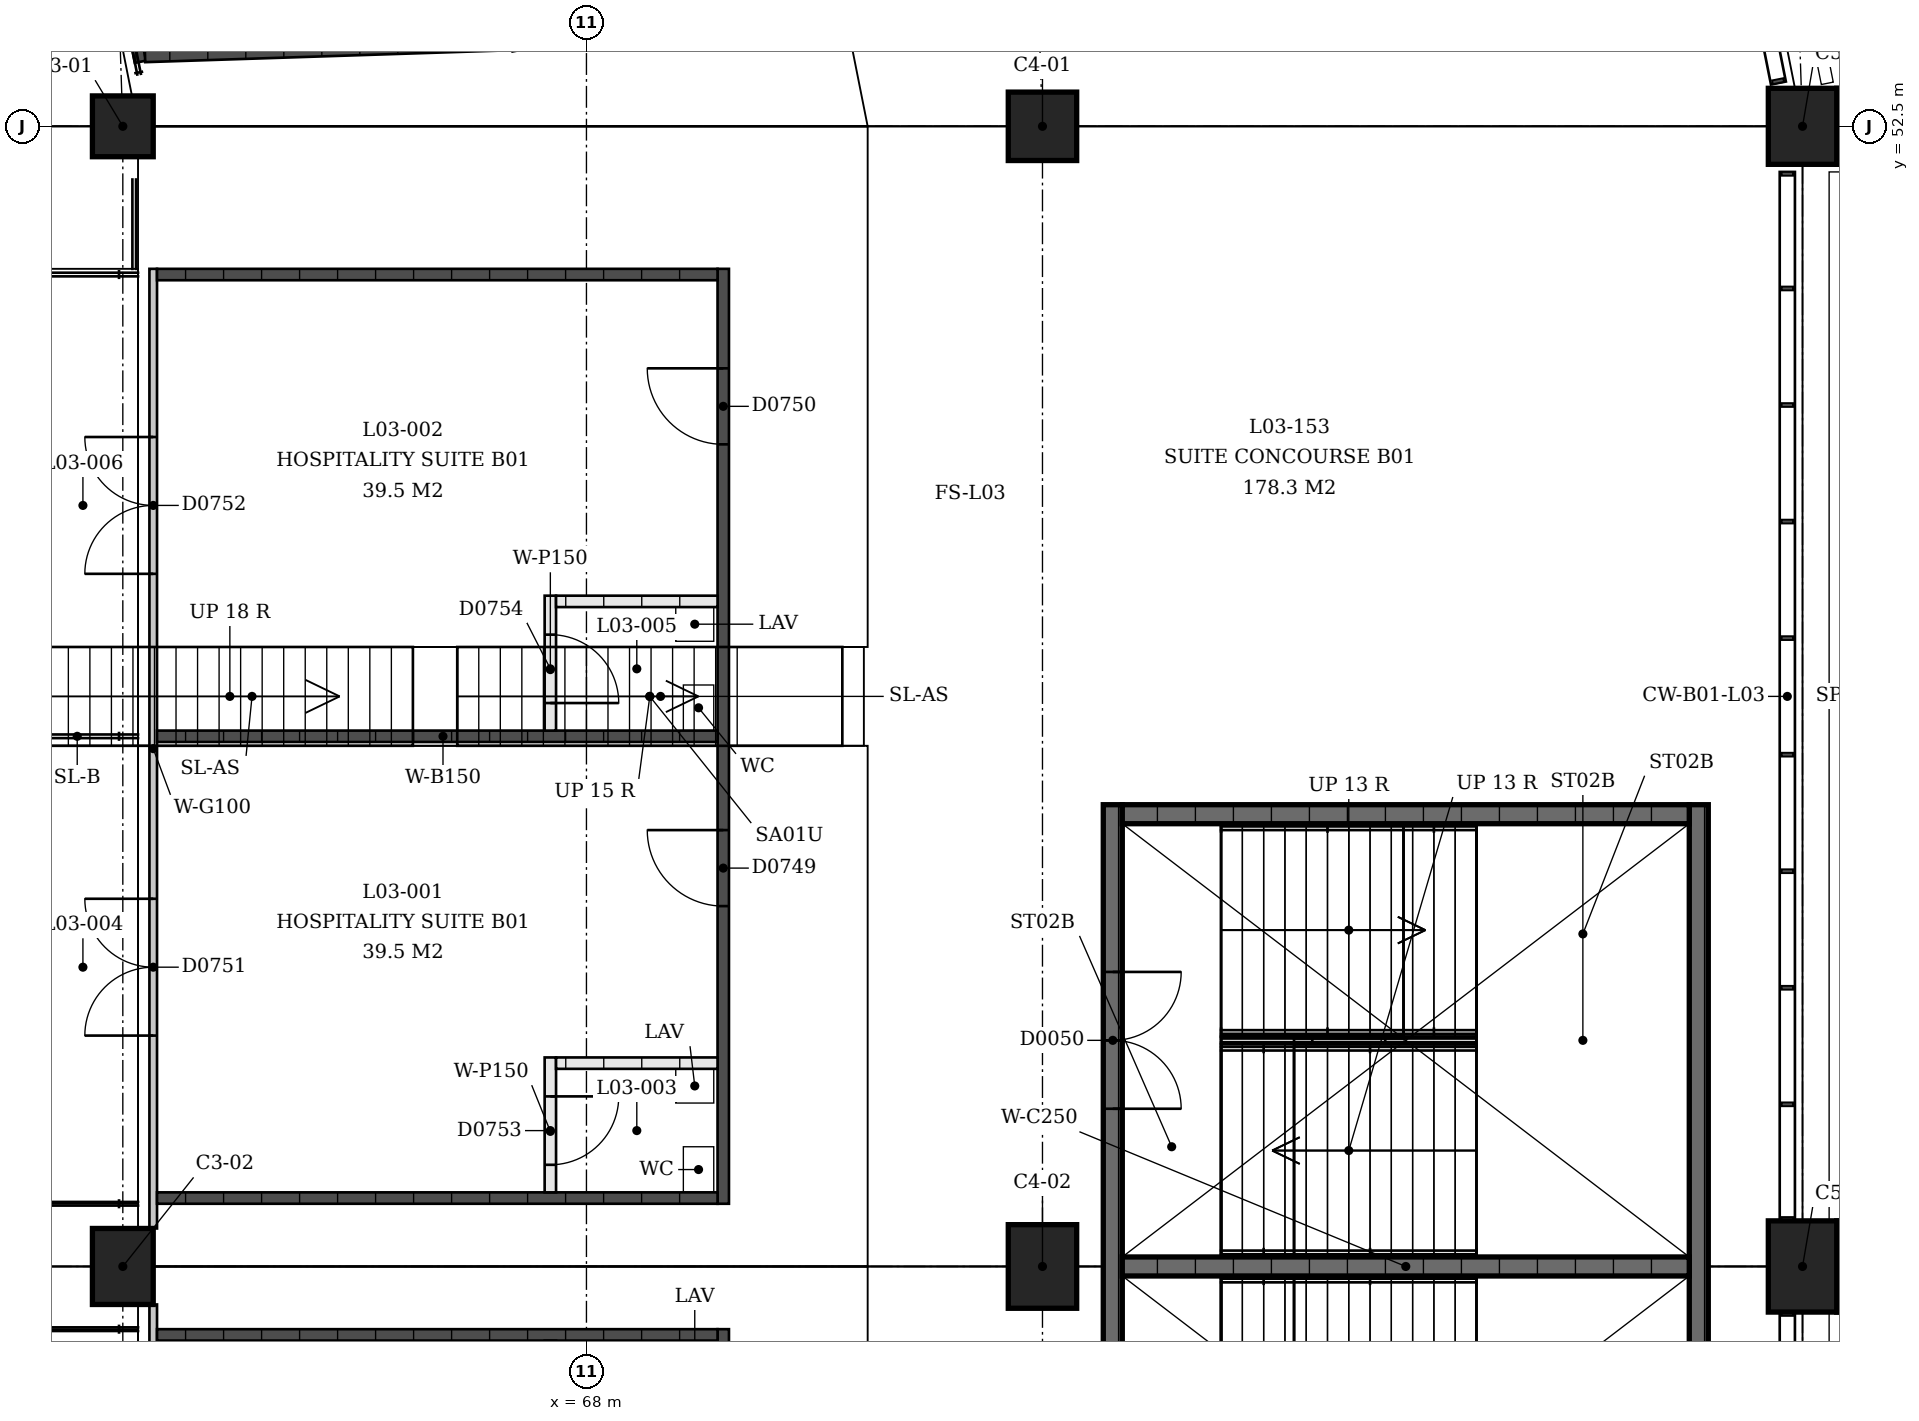
"""IFC4 building model, lengths in metres.
Left out: names, types, materials, properties, quantities, classifications, styles, units other than length and angle.
Written with IfcOpenShell. Run it as: python <this file> out.ifc"""

import sys

from ifc_helpers import new_model, si_unit, direction, frame, frame_2d, origin, origin_2d, place, context, subcontext, project, spatial, rectangle, extrude, element, fill, save


model = new_model("IFC4")
c1 = context("Model", 3, precision=1e-05, world=origin(), true_north=direction((0.0, 1.0)))
c2 = subcontext(c1, "Body", "Model", "MODEL_VIEW")
j1 = project(units=[si_unit("LENGTHUNIT", "METRE"), si_unit("PLANEANGLEUNIT", "RADIAN")], contexts=[c1])
p1 = place(None, origin())
s1 = spatial("IfcSite", under=j1, at=p1, CompositionType="ELEMENT")
p2 = place(p1, origin())
s2 = spatial("IfcBuilding", under=s1, at=p2, CompositionType="ELEMENT")
p3 = place(p2, frame((0.0, 0.0, 13.5)))
s3 = spatial("IfcBuildingStorey", under=s2, at=p3, CompositionType="ELEMENT", Elevation=13.5)
p4 = place(p3, frame((61.9, 52.5, 0.0), z_axis=(0.0, 0.0, 1.0), x_axis=(0.0, 1.0, 0.0)))
e1 = element("IfcColumn", 1, at=p4, inside=s3, PredefinedType="COLUMN", context=c2, shape_type="SweptSolid", body=[
    extrude(rectangle(XDim=0.8, YDim=0.8, at=origin_2d()), origin(), (0.0, 0.0, 1.0), 2.033),
])
p5 = place(p3, frame((74.0, 52.5, 0.0), z_axis=(0.0, 0.0, 1.0), x_axis=(0.0, 1.0, 0.0)))
e2 = element("IfcColumn", 2, at=p5, inside=s3, PredefinedType="COLUMN", context=c2, shape_type="SweptSolid", body=[
    extrude(rectangle(XDim=0.9, YDim=0.9, at=origin_2d()), origin(), (0.0, 0.0, 1.0), 4.5),
])
p6 = place(p3, frame((84.0, 52.5, 0.0), z_axis=(0.0, 0.0, 1.0), x_axis=(0.0, 1.0, 0.0)))
e3 = element("IfcColumn", 3, at=p6, inside=s3, PredefinedType="COLUMN", context=c2, shape_type="SweptSolid", body=[
    extrude(rectangle(XDim=1.0, YDim=0.9, at=origin_2d()), origin(), (0.0, 0.0, 1.0), 4.5),
])
p7 = place(p3, frame((61.9, 37.5, 0.0), z_axis=(0.0, 0.0, 1.0), x_axis=(0.0, 1.0, 0.0)))
e4 = element("IfcColumn", 4, at=p7, inside=s3, PredefinedType="COLUMN", context=c2, shape_type="SweptSolid", body=[
    extrude(rectangle(XDim=1.0, YDim=0.8, at=origin_2d()), origin(), (0.0, 0.0, 1.0), 2.033),
])
p8 = place(p3, frame((74.0, 37.5, 0.0), z_axis=(0.0, 0.0, 1.0), x_axis=(0.0, 1.0, 0.0)))
e5 = element("IfcColumn", 5, at=p8, inside=s3, PredefinedType="COLUMN", context=c2, shape_type="SweptSolid", body=[
    extrude(rectangle(XDim=1.1, YDim=0.9, at=origin_2d()), origin(), (0.0, 0.0, 1.0), 4.5),
])
p9 = place(p3, frame((84.0, 37.5, 0.0), z_axis=(0.0, 0.0, 1.0), x_axis=(0.0, 1.0, 0.0)))
e6 = element("IfcColumn", 6, at=p9, inside=s3, PredefinedType="COLUMN", context=c2, shape_type="SweptSolid", body=[
    extrude(rectangle(XDim=1.2, YDim=0.9, at=origin_2d()), origin(), (0.0, 0.0, 1.0), 4.5),
])
p10 = place(p3, frame((74.925, 31.425, 0.0), z_axis=(0.0, 0.0, 1.0), x_axis=(0.0, 1.0, 0.0)))
e7 = element("IfcWall", 7, at=p10, inside=s3, PredefinedType="SHEAR", context=c2, shape_type="SweptSolid", body=[
    extrude(rectangle(XDim=12.15, YDim=0.25, at=frame_2d((6.075, 0.0))), origin(), (0.0, 0.0, 1.0), 4.09),
])
p11 = place(p10, frame((2.2, 0.0, 0.0)))
e8 = element("IfcOpeningElement", 8, at=p11, cuts=e7, PredefinedType="OPENING", context=c2, shape_type="SweptSolid", body=[
    extrude(rectangle(XDim=1.8, YDim=2.1, at=frame_2d((0.9, 1.05))), frame((0.0, 0.125, 0.0), z_axis=(0.0, -1.0, 0.0), x_axis=(1.0, 0.0, 0.0)), (0.0, 0.0, 1.0), 0.25),
])
p12 = place(p10, frame((8.15, 0.0, 0.0)))
e9 = element("IfcOpeningElement", 9, at=p12, cuts=e7, PredefinedType="OPENING", context=c2, shape_type="SweptSolid", body=[
    extrude(rectangle(XDim=1.8, YDim=2.1, at=frame_2d((0.9, 1.05))), frame((0.0, 0.125, 0.0), z_axis=(0.0, -1.0, 0.0), x_axis=(1.0, 0.0, 0.0)), (0.0, 0.0, 1.0), 0.25),
])
p13 = place(p3, frame((82.635, 31.425, 0.0), z_axis=(0.0, 0.0, 1.0), x_axis=(0.0, 1.0, 0.0)))
e10 = element("IfcWall", 10, at=p13, inside=s3, PredefinedType="SHEAR", context=c2, shape_type="SweptSolid", body=[
    extrude(rectangle(XDim=12.15, YDim=0.25, at=frame_2d((6.075, 0.0))), origin(), (0.0, 0.0, 1.0), 4.09),
])
for number, where, z_axis, x_axis in (
    (11, (75.05, 43.45, 0.0), (0.0, 0.0, 1.0), (1.0, 0.0, 0.0)),
    (12, (75.05, 37.5, 0.0), (0.0, 0.0, 1.0), (1.0, 0.0, 0.0)),
):
    element("IfcWall", number, at=place(p3, frame(where, z_axis=z_axis, x_axis=x_axis)), inside=s3, PredefinedType="SHEAR", context=c2, shape_type="SweptSolid", body=[
        extrude(rectangle(XDim=7.46, YDim=0.25, at=frame_2d((3.73, 0.0))), origin(), (0.0, 0.0, 1.0), 4.09),
    ])
p14 = place(p3, frame((62.3, 38.0, 0.0), z_axis=(0.0, 0.0, 1.0), x_axis=(0.0, 1.0, 0.0)))
e13 = element("IfcWall", 13, at=p14, inside=s3, PredefinedType="PARTITIONING", context=c2, shape_type="SweptSolid", body=[
    extrude(rectangle(XDim=12.625, YDim=0.1, at=frame_2d((6.312, 0.0))), origin(), (0.0, 0.0, 1.0), 3.0),
])
p15 = place(p14, frame((2.538, 0.0, 0.0)))
e14 = element("IfcOpeningElement", 14, at=p15, cuts=e13, PredefinedType="OPENING", context=c2, shape_type="SweptSolid", body=[
    extrude(rectangle(XDim=1.8, YDim=2.1, at=frame_2d((0.9, 1.05))), frame((0.0, 0.05, 0.0), z_axis=(0.0, -1.0, 0.0), x_axis=(1.0, 0.0, 0.0)), (0.0, 0.0, 1.0), 0.1),
])
p16 = place(p14, frame((8.613, 0.0, 0.0)))
e15 = element("IfcOpeningElement", 15, at=p16, cuts=e13, PredefinedType="OPENING", context=c2, shape_type="SweptSolid", body=[
    extrude(rectangle(XDim=1.8, YDim=2.1, at=frame_2d((0.9, 1.05))), frame((0.0, 0.05, 0.0), z_axis=(0.0, -1.0, 0.0), x_axis=(1.0, 0.0, 0.0)), (0.0, 0.0, 1.0), 0.1),
])
p17 = place(p3, frame((69.8, 38.325, 0.0), z_axis=(0.0, 0.0, 1.0), x_axis=(0.0, 1.0, 0.0)))
e16 = element("IfcWall", 16, at=p17, inside=s3, PredefinedType="SOLIDWALL", context=c2, shape_type="SweptSolid", body=[
    extrude(rectangle(XDim=12.3, YDim=0.15, at=frame_2d((6.15, 0.0))), origin(), (0.0, 0.0, 1.0), 3.0),
])
p18 = place(p17, frame((3.916, 0.0, 0.0)))
e17 = element("IfcOpeningElement", 17, at=p18, cuts=e16, PredefinedType="OPENING", context=c2, shape_type="SweptSolid", body=[
    extrude(rectangle(XDim=1.0, YDim=2.1, at=frame_2d((0.5, 1.05))), frame((0.0, 0.075, 0.0), z_axis=(0.0, -1.0, 0.0), x_axis=(1.0, 0.0, 0.0)), (0.0, 0.0, 1.0), 0.15),
])
p19 = place(p17, frame((9.991, 0.0, 0.0)))
e18 = element("IfcOpeningElement", 18, at=p19, cuts=e16, PredefinedType="OPENING", context=c2, shape_type="SweptSolid", body=[
    extrude(rectangle(XDim=1.0, YDim=2.1, at=frame_2d((0.5, 1.05))), frame((0.0, 0.075, 0.0), z_axis=(0.0, -1.0, 0.0), x_axis=(1.0, 0.0, 0.0)), (0.0, 0.0, 1.0), 0.15),
])
for number, where, z_axis, x_axis in (
    (19, (62.35, 38.4, 0.0), (0.0, 0.0, 1.0), (1.0, 0.0, 0.0)),
    (20, (62.35, 44.475, 0.0), (0.0, 0.0, 1.0), (1.0, 0.0, 0.0)),
    (21, (62.35, 50.55, 0.0), (0.0, 0.0, 1.0), (1.0, 0.0, 0.0)),
):
    element("IfcWall", number, at=place(p3, frame(where, z_axis=z_axis, x_axis=x_axis)), inside=s3, PredefinedType="SOLIDWALL", context=c2, shape_type="SweptSolid", body=[
        extrude(rectangle(XDim=7.375, YDim=0.15, at=frame_2d((3.688, 0.0))), origin(), (0.0, 0.0, 1.0), 3.0),
    ])
p20 = place(p3, frame((67.525, 38.475, 0.0), z_axis=(0.0, 0.0, 1.0), x_axis=(0.0, 1.0, 0.0)))
e22 = element("IfcWall", 22, at=p20, inside=s3, PredefinedType="PARTITIONING", context=c2, shape_type="SweptSolid", body=[
    extrude(rectangle(XDim=1.775, YDim=0.15, at=frame_2d((0.887, 0.0))), origin(), (0.0, 0.0, 1.0), 3.0),
])
p21 = place(p20, frame((0.363, 0.0, 0.0)))
e23 = element("IfcOpeningElement", 23, at=p21, cuts=e22, PredefinedType="OPENING", context=c2, shape_type="SweptSolid", body=[
    extrude(rectangle(XDim=0.9, YDim=2.1, at=frame_2d((0.45, 1.05))), frame((0.0, 0.075, 0.0), z_axis=(0.0, -1.0, 0.0), x_axis=(1.0, 0.0, 0.0)), (0.0, 0.0, 1.0), 0.15),
])
p22 = place(p3, frame((67.6, 40.175, 0.0), z_axis=(0.0, 0.0, 1.0), x_axis=(1.0, 0.0, 0.0)))
e24 = element("IfcWall", 24, at=p22, inside=s3, PredefinedType="PARTITIONING", context=c2, shape_type="SweptSolid", body=[
    extrude(rectangle(XDim=2.125, YDim=0.15, at=frame_2d((1.062, 0.0))), origin(), (0.0, 0.0, 1.0), 3.0),
])
p23 = place(p3, frame((67.525, 44.55, 0.0), z_axis=(0.0, 0.0, 1.0), x_axis=(0.0, 1.0, 0.0)))
e25 = element("IfcWall", 25, at=p23, inside=s3, PredefinedType="PARTITIONING", context=c2, shape_type="SweptSolid", body=[
    extrude(rectangle(XDim=1.775, YDim=0.15, at=frame_2d((0.887, 0.0))), origin(), (0.0, 0.0, 1.0), 3.0),
])
p24 = place(p23, frame((0.363, 0.0, 0.0)))
e26 = element("IfcOpeningElement", 26, at=p24, cuts=e25, PredefinedType="OPENING", context=c2, shape_type="SweptSolid", body=[
    extrude(rectangle(XDim=0.9, YDim=2.1, at=frame_2d((0.45, 1.05))), frame((0.0, 0.075, 0.0), z_axis=(0.0, -1.0, 0.0), x_axis=(1.0, 0.0, 0.0)), (0.0, 0.0, 1.0), 0.15),
])
p25 = place(p3, frame((67.6, 46.25, 0.0), z_axis=(0.0, 0.0, 1.0), x_axis=(1.0, 0.0, 0.0)))
e27 = element("IfcWall", 27, at=p25, inside=s3, PredefinedType="PARTITIONING", context=c2, shape_type="SweptSolid", body=[
    extrude(rectangle(XDim=2.125, YDim=0.15, at=frame_2d((1.062, 0.0))), origin(), (0.0, 0.0, 1.0), 3.0),
])
p26 = place(p3, frame((62.3, 37.0, 0.0), z_axis=(0.0, 0.0, 1.0), x_axis=(0.0, -1.0, 0.0)))
e28 = element("IfcWall", 28, at=p26, inside=s3, PredefinedType="PARTITIONING", context=c2, shape_type="SweptSolid", body=[
    extrude(rectangle(XDim=12.625, YDim=0.1, at=frame_2d((6.312, 0.0))), origin(), (0.0, 0.0, 1.0), 3.0),
])
p27 = place(p26, frame((2.538, 0.0, 0.0)))
e29 = element("IfcOpeningElement", 29, at=p27, cuts=e28, PredefinedType="OPENING", context=c2, shape_type="SweptSolid", body=[
    extrude(rectangle(XDim=1.8, YDim=2.1, at=frame_2d((0.9, 1.05))), frame((0.0, 0.05, 0.0), z_axis=(0.0, -1.0, 0.0), x_axis=(1.0, 0.0, 0.0)), (0.0, 0.0, 1.0), 0.1),
])
p28 = place(p26, frame((8.613, 0.0, 0.0)))
e30 = element("IfcOpeningElement", 30, at=p28, cuts=e28, PredefinedType="OPENING", context=c2, shape_type="SweptSolid", body=[
    extrude(rectangle(XDim=1.8, YDim=2.1, at=frame_2d((0.9, 1.05))), frame((0.0, 0.05, 0.0), z_axis=(0.0, -1.0, 0.0), x_axis=(1.0, 0.0, 0.0)), (0.0, 0.0, 1.0), 0.1),
])
p29 = place(p3, frame((69.8, 36.675, 0.0), z_axis=(0.0, 0.0, 1.0), x_axis=(0.0, -1.0, 0.0)))
e31 = element("IfcWall", 31, at=p29, inside=s3, PredefinedType="SOLIDWALL", context=c2, shape_type="SweptSolid", body=[
    extrude(rectangle(XDim=12.3, YDim=0.15, at=frame_2d((6.15, 0.0))), origin(), (0.0, 0.0, 1.0), 3.0),
])
p30 = place(p29, frame((3.916, 0.0, 0.0)))
e32 = element("IfcOpeningElement", 32, at=p30, cuts=e31, PredefinedType="OPENING", context=c2, shape_type="SweptSolid", body=[
    extrude(rectangle(XDim=1.0, YDim=2.1, at=frame_2d((0.5, 1.05))), frame((0.0, 0.075, 0.0), z_axis=(0.0, -1.0, 0.0), x_axis=(1.0, 0.0, 0.0)), (0.0, 0.0, 1.0), 0.15),
])
p31 = place(p29, frame((9.991, 0.0, 0.0)))
e33 = element("IfcOpeningElement", 33, at=p31, cuts=e31, PredefinedType="OPENING", context=c2, shape_type="SweptSolid", body=[
    extrude(rectangle(XDim=1.0, YDim=2.1, at=frame_2d((0.5, 1.05))), frame((0.0, 0.075, 0.0), z_axis=(0.0, -1.0, 0.0), x_axis=(1.0, 0.0, 0.0)), (0.0, 0.0, 1.0), 0.15),
])
p32 = place(p3, frame((62.35, 36.6, 0.0), z_axis=(0.0, 0.0, 1.0), x_axis=(1.0, 0.0, 0.0)))
e34 = element("IfcWall", 34, at=p32, inside=s3, PredefinedType="SOLIDWALL", context=c2, shape_type="SweptSolid", body=[
    extrude(rectangle(XDim=7.375, YDim=0.15, at=frame_2d((3.688, 0.0))), origin(), (0.0, 0.0, 1.0), 3.0),
])
p33 = place(p3, frame((67.525, 36.525, 0.0), z_axis=(0.0, 0.0, 1.0), x_axis=(0.0, -1.0, 0.0)))
e35 = element("IfcWall", 35, at=p33, inside=s3, PredefinedType="PARTITIONING", context=c2, shape_type="SweptSolid", body=[
    extrude(rectangle(XDim=1.775, YDim=0.15, at=frame_2d((0.887, 0.0))), origin(), (0.0, 0.0, 1.0), 3.0),
])
p34 = place(p33, frame((0.363, 0.0, 0.0)))
e36 = element("IfcOpeningElement", 36, at=p34, cuts=e35, PredefinedType="OPENING", context=c2, shape_type="SweptSolid", body=[
    extrude(rectangle(XDim=0.9, YDim=2.1, at=frame_2d((0.45, 1.05))), frame((0.0, 0.075, 0.0), z_axis=(0.0, -1.0, 0.0), x_axis=(1.0, 0.0, 0.0)), (0.0, 0.0, 1.0), 0.15),
])
p35 = place(p3, frame((60.235, 62.88, 0.0), z_axis=(0.0, 0.0, 1.0), x_axis=(0.19508210738, -0.98078691436, 0.0)))
e37 = element("IfcWall", 37, at=p35, inside=s3, PredefinedType="SOLIDWALL", context=c2, shape_type="SweptSolid", body=[
    extrude(rectangle(XDim=9.718, YDim=0.15, at=frame_2d((4.859, 0.0))), origin(), (0.0, 0.0, 1.0), 3.0),
])
p36 = place(p3, frame((62.192, 53.419, 0.0), z_axis=(0.0, 0.0, 1.0), x_axis=(0.999469799468, 0.032559483284, 0.0)))
e38 = element("IfcWall", 38, at=p36, inside=s3, PredefinedType="SOLIDWALL", context=c2, shape_type="SweptSolid", body=[
    extrude(rectangle(XDim=4.821, YDim=0.15, at=frame_2d((2.411, 0.0))), origin(), (0.0, 0.0, 1.0), 3.0),
])
p37 = place(p12, origin())
e39 = element("IfcDoor", 39, at=p37, inside=s3, OperationType="DOUBLE_DOOR_SINGLE_SWING", PredefinedType="DOOR", context=c2, shape_type="SweptSolid", body=[
    extrude(rectangle(XDim=1.8, YDim=2.1, at=frame_2d((0.9, 1.05))), frame((0.0, 0.025, 0.0), z_axis=(0.0, -1.0, 0.0), x_axis=(1.0, 0.0, 0.0)), (0.0, 0.0, 1.0), 0.05),
])
fill(e9, e39)
p38 = place(p18, origin())
e40 = element("IfcDoor", 40, at=p38, inside=s3, OperationType="SINGLE_SWING_LEFT", PredefinedType="DOOR", context=c2, shape_type="SweptSolid", body=[
    extrude(rectangle(XDim=1.0, YDim=2.1, at=frame_2d((0.5, 1.05))), frame((0.0, 0.025, 0.0), z_axis=(0.0, -1.0, 0.0), x_axis=(1.0, 0.0, 0.0)), (0.0, 0.0, 1.0), 0.05),
])
fill(e17, e40)
p39 = place(p19, origin())
e41 = element("IfcDoor", 41, at=p39, inside=s3, OperationType="SINGLE_SWING_LEFT", PredefinedType="DOOR", context=c2, shape_type="SweptSolid", body=[
    extrude(rectangle(XDim=1.0, YDim=2.1, at=frame_2d((0.5, 1.05))), frame((0.0, 0.025, 0.0), z_axis=(0.0, -1.0, 0.0), x_axis=(1.0, 0.0, 0.0)), (0.0, 0.0, 1.0), 0.05),
])
fill(e18, e41)
p40 = place(p15, origin())
e42 = element("IfcDoor", 42, at=p40, inside=s3, OperationType="DOUBLE_DOOR_SINGLE_SWING", PredefinedType="DOOR", context=c2, shape_type="SweptSolid", body=[
    extrude(rectangle(XDim=1.8, YDim=2.1, at=frame_2d((0.9, 1.05))), frame((0.0, 0.025, 0.0), z_axis=(0.0, -1.0, 0.0), x_axis=(1.0, 0.0, 0.0)), (0.0, 0.0, 1.0), 0.05),
])
fill(e14, e42)
p41 = place(p16, origin())
e43 = element("IfcDoor", 43, at=p41, inside=s3, OperationType="DOUBLE_DOOR_SINGLE_SWING", PredefinedType="DOOR", context=c2, shape_type="SweptSolid", body=[
    extrude(rectangle(XDim=1.8, YDim=2.1, at=frame_2d((0.9, 1.05))), frame((0.0, 0.025, 0.0), z_axis=(0.0, -1.0, 0.0), x_axis=(1.0, 0.0, 0.0)), (0.0, 0.0, 1.0), 0.05),
])
fill(e15, e43)
p42 = place(p21, origin())
e44 = element("IfcDoor", 44, at=p42, inside=s3, OperationType="SINGLE_SWING_RIGHT", PredefinedType="DOOR", context=c2, shape_type="SweptSolid", body=[
    extrude(rectangle(XDim=0.9, YDim=2.1, at=frame_2d((0.45, 1.05))), frame((0.0, 0.025, 0.0), z_axis=(0.0, -1.0, 0.0), x_axis=(1.0, 0.0, 0.0)), (0.0, 0.0, 1.0), 0.05),
])
fill(e23, e44)
p43 = place(p24, origin())
e45 = element("IfcDoor", 45, at=p43, inside=s3, OperationType="SINGLE_SWING_LEFT", PredefinedType="DOOR", context=c2, shape_type="SweptSolid", body=[
    extrude(rectangle(XDim=0.9, YDim=2.1, at=frame_2d((0.45, 1.05))), frame((0.0, 0.025, 0.0), z_axis=(0.0, -1.0, 0.0), x_axis=(1.0, 0.0, 0.0)), (0.0, 0.0, 1.0), 0.05),
])
fill(e26, e45)
save(model, sys.argv[1])
